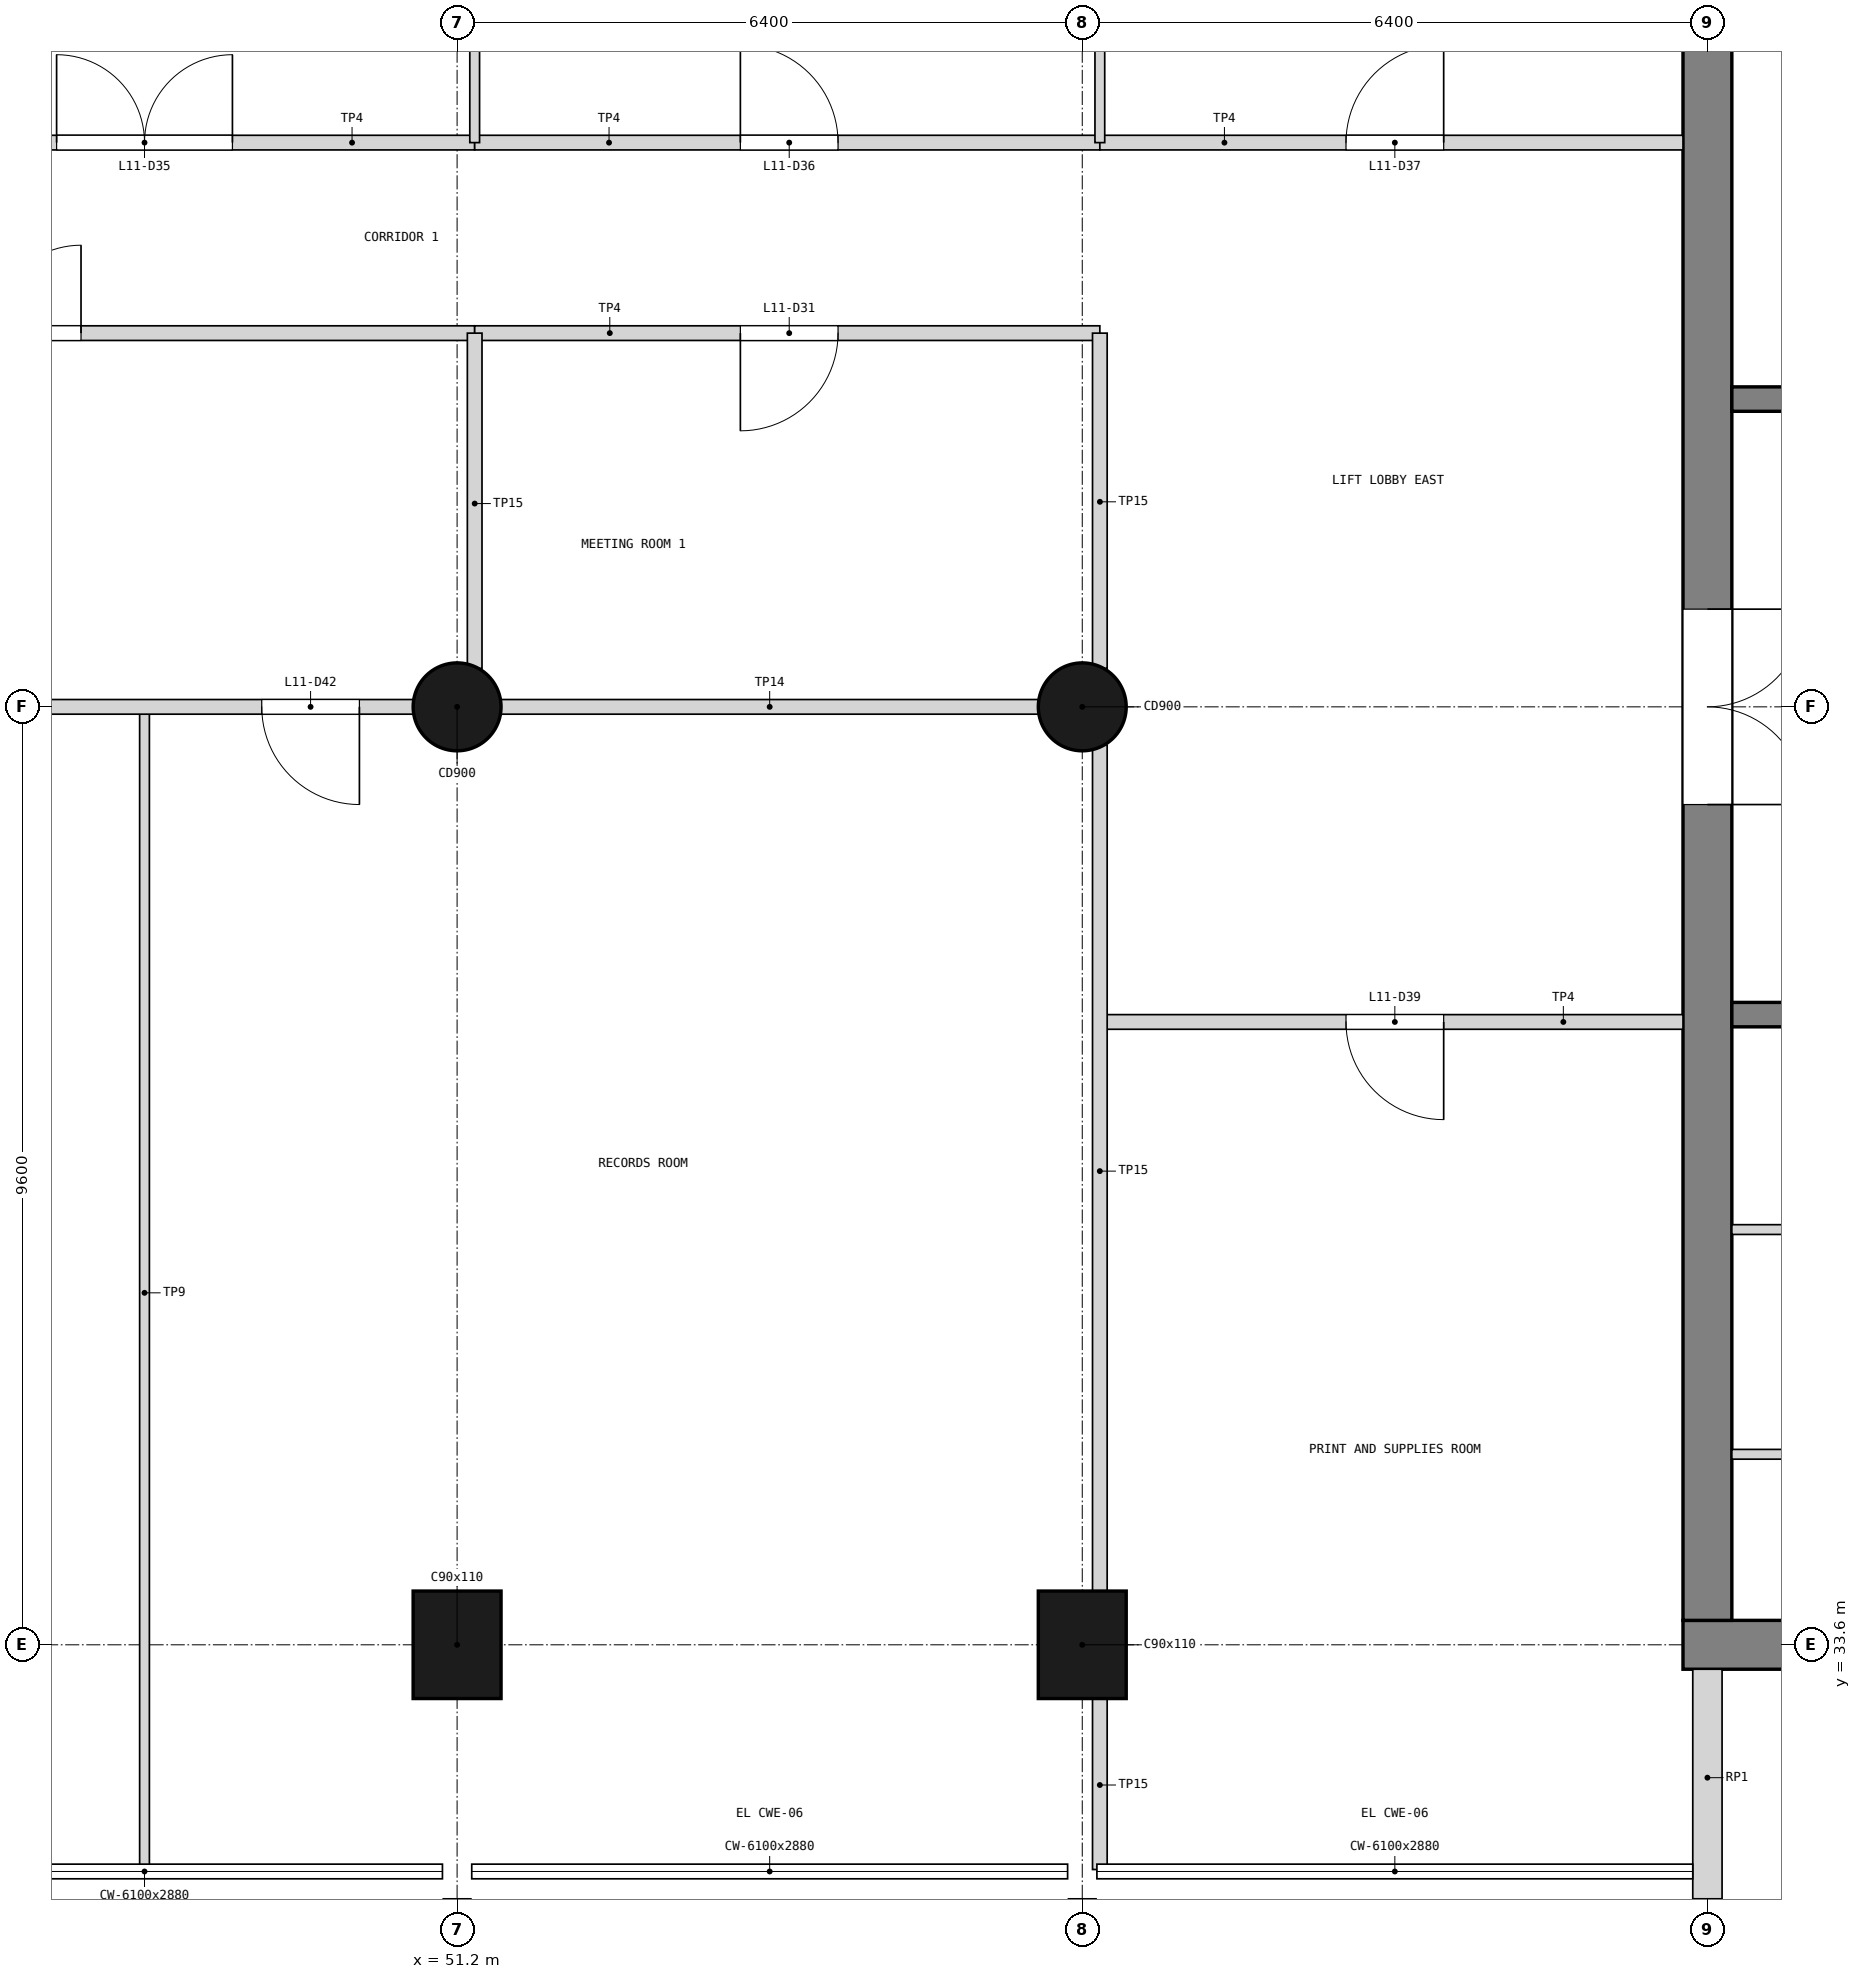
"""IFC4 building model, lengths in metres.
Left out: names, types, materials, properties, quantities, classifications, styles, units other than length and angle.
Written with IfcOpenShell. Run it as: python <this file> out.ifc"""

import sys

from ifc_helpers import new_model, si_unit, direction, frame, frame_2d, origin, origin_2d, place, context, subcontext, project, spatial, rectangle, circle, extrude, element, fill, save


model = new_model("IFC4")
c1 = context("Model", 3, precision=1e-05, world=origin(), true_north=direction((0.0, 1.0)))
c2 = subcontext(c1, "Body", "Model", "MODEL_VIEW")
j1 = project(units=[si_unit("LENGTHUNIT", "METRE"), si_unit("PLANEANGLEUNIT", "RADIAN")], contexts=[c1])
p1 = place(None, origin())
s1 = spatial("IfcSite", under=j1, at=p1, CompositionType="ELEMENT")
p2 = place(p1, origin())
s2 = spatial("IfcBuilding", under=s1, at=p2, CompositionType="ELEMENT")
p3 = place(p2, frame((0.0, 0.0, 44.4)))
s3 = spatial("IfcBuildingStorey", under=s2, at=p3, CompositionType="ELEMENT", Elevation=44.4)
p4 = place(p3, frame((63.75, 33.6, 0.0), z_axis=(0.0, 0.0, 1.0), x_axis=(1.0, 0.0, 0.0)))
e1 = element("IfcWall", 1, at=p4, inside=s3, PredefinedType="SHEAR", context=c2, shape_type="SweptSolid", body=[
    extrude(rectangle(XDim=13.3, YDim=0.5, at=frame_2d((6.65, 0.0))), origin(), (0.0, 0.0, 1.0), 3.9),
])
p5 = place(p4, frame((11.05, 0.0, 1.0)))
e2 = element("IfcOpeningElement", 2, at=p5, cuts=e1, PredefinedType="OPENING", context=c2, shape_type="SweptSolid", body=[
    extrude(rectangle(XDim=0.4, YDim=2.0, at=frame_2d((0.2, 1.0))), frame((0.0, 0.26, 0.0), z_axis=(0.0, -1.0, 0.0), x_axis=(1.0, 0.0, 0.0)), (0.0, 0.0, 1.0), 0.52),
])
p6 = place(p3, frame((64.0, 33.85, 0.0), z_axis=(0.0, 0.0, 1.0), x_axis=(0.0, 1.0, 0.0)))
e3 = element("IfcWall", 3, at=p6, inside=s3, PredefinedType="SHEAR", context=c2, shape_type="SweptSolid", body=[
    extrude(rectangle(XDim=18.7, YDim=0.5, at=frame_2d((9.35, 0.0))), origin(), (0.0, 0.0, 1.0), 3.9),
])
p7 = place(p6, frame((8.35, 0.0, 0.0)))
e4 = element("IfcOpeningElement", 4, at=p7, cuts=e3, PredefinedType="OPENING", context=c2, shape_type="SweptSolid", body=[
    extrude(rectangle(XDim=2.0, YDim=2.1, at=frame_2d((1.0, 1.05))), frame((0.0, 0.26, 0.0), z_axis=(0.0, -1.0, 0.0), x_axis=(1.0, 0.0, 0.0)), (0.0, 0.0, 1.0), 0.52),
])
p8 = place(p3, frame((51.2, 33.6, 0.0), z_axis=(0.0, 0.0, 1.0), x_axis=(1.0, 0.0, 0.0)))
e5 = element("IfcColumn", 5, at=p8, inside=s3, PredefinedType="COLUMN", context=c2, shape_type="SweptSolid", body=[
    extrude(rectangle(XDim=0.9, YDim=1.1, at=origin_2d()), origin(), (0.0, 0.0, 1.0), 3.9),
])
p9 = place(p3, frame((51.2, 43.2, 0.0), z_axis=(0.0, 0.0, 1.0), x_axis=(1.0, 0.0, 0.0)))
e6 = element("IfcColumn", 6, at=p9, inside=s3, PredefinedType="COLUMN", context=c2, shape_type="SweptSolid", body=[
    extrude(circle(Radius=0.45, at=origin_2d()), origin(), (0.0, 0.0, 1.0), 3.9),
])
p10 = place(p3, frame((57.6, 33.6, 0.0), z_axis=(0.0, 0.0, 1.0), x_axis=(1.0, 0.0, 0.0)))
e7 = element("IfcColumn", 7, at=p10, inside=s3, PredefinedType="COLUMN", context=c2, shape_type="SweptSolid", body=[
    extrude(rectangle(XDim=0.9, YDim=1.1, at=origin_2d()), origin(), (0.0, 0.0, 1.0), 3.9),
])
p11 = place(p3, frame((57.6, 43.2, 0.0), z_axis=(0.0, 0.0, 1.0), x_axis=(1.0, 0.0, 0.0)))
e8 = element("IfcColumn", 8, at=p11, inside=s3, PredefinedType="COLUMN", context=c2, shape_type="SweptSolid", body=[
    extrude(circle(Radius=0.45, at=origin_2d()), origin(), (0.0, 0.0, 1.0), 3.9),
])
p12 = place(p3, frame((64.0, 31.0, 0.0), z_axis=(0.0, 0.0, 1.0), x_axis=(0.0, 1.0, 0.0)))
e9 = element("IfcWall", 9, at=p12, inside=s3, PredefinedType="SOLIDWALL", context=c2, shape_type="SweptSolid", body=[
    extrude(rectangle(XDim=2.35, YDim=0.3, at=frame_2d((1.175, 0.0))), origin(), (0.0, 0.0, 1.0), 2.88),
])
for number, where, z_axis, x_axis in (
    (10, (69.725, 40.05, 0.0), (0.0, 0.0, 1.0), (-1.0, 0.0, 0.0)),
    (11, (69.725, 46.35, 0.0), (0.0, 0.0, 1.0), (-1.0, 0.0, 0.0)),
):
    element("IfcWall", number, at=place(p3, frame(where, z_axis=z_axis, x_axis=x_axis)), inside=s3, PredefinedType="SOLIDWALL", context=c2, shape_type="SweptSolid", body=[
        extrude(rectangle(XDim=5.475, YDim=0.25, at=frame_2d((2.738, 0.0))), origin(), (0.0, 0.0, 1.0), 3.6),
    ])
p13 = place(p3, frame((69.475, 35.55, 0.0), z_axis=(0.0, 0.0, 1.0), x_axis=(-1.0, 0.0, 0.0)))
e12 = element("IfcWall", 12, at=p13, inside=s3, PredefinedType="PARTITIONING", context=c2, shape_type="SweptSolid", body=[
    extrude(rectangle(XDim=5.225, YDim=0.1, at=frame_2d((2.613, 0.0))), origin(), (0.0, 0.0, 1.0), 3.6),
])
p14 = place(p3, frame((67.925, 37.85, 0.0), z_axis=(0.0, 0.0, 1.0), x_axis=(-1.0, 0.0, 0.0)))
e13 = element("IfcWall", 13, at=p14, inside=s3, PredefinedType="PARTITIONING", context=c2, shape_type="SweptSolid", body=[
    extrude(rectangle(XDim=3.675, YDim=0.1, at=frame_2d((1.837, 0.0))), origin(), (0.0, 0.0, 1.0), 3.6),
])
p15 = place(p3, frame((48.0, 31.3, 0.0), z_axis=(0.0, 0.0, 1.0), x_axis=(0.0, 1.0, 0.0)))
e14 = element("IfcWall", 14, at=p15, inside=s3, PredefinedType="PARTITIONING", context=c2, shape_type="SweptSolid", body=[
    extrude(rectangle(XDim=11.9, YDim=0.1, at=frame_2d((5.95, 0.0))), origin(), (0.0, 0.0, 1.0), 3.08),
])
p16 = place(p3, frame((31.82, 47.025, 0.0), z_axis=(0.0, 0.0, 1.0), x_axis=(1.0, 0.0, 0.0)))
e15 = element("IfcWall", 15, at=p16, inside=s3, PredefinedType="PARTITIONING", context=c2, shape_type="SweptSolid", body=[
    extrude(rectangle(XDim=19.56, YDim=0.15, at=frame_2d((9.78, 0.0))), origin(), (0.0, 0.0, 1.0), 3.68),
])
p17 = place(p16, frame((4.03, 0.0, 0.0)))
e16 = element("IfcOpeningElement", 16, at=p17, cuts=e15, PredefinedType="OPENING", context=c2, shape_type="SweptSolid", body=[
    extrude(rectangle(XDim=1.8, YDim=2.1, at=frame_2d((0.9, 1.05))), frame((0.0, 0.085, 0.0), z_axis=(0.0, -1.0, 0.0), x_axis=(1.0, 0.0, 0.0)), (0.0, 0.0, 1.0), 0.17),
])
p18 = place(p16, frame((13.73, 0.0, 0.0)))
e17 = element("IfcOpeningElement", 17, at=p18, cuts=e15, PredefinedType="OPENING", context=c2, shape_type="SweptSolid", body=[
    extrude(rectangle(XDim=1.8, YDim=2.1, at=frame_2d((0.9, 1.05))), frame((0.0, 0.085, 0.0), z_axis=(0.0, -1.0, 0.0), x_axis=(1.0, 0.0, 0.0)), (0.0, 0.0, 1.0), 0.17),
])
p19 = place(p3, frame((51.38, 47.025, 0.0), z_axis=(0.0, 0.0, 1.0), x_axis=(1.0, 0.0, 0.0)))
e18 = element("IfcWall", 18, at=p19, inside=s3, PredefinedType="PARTITIONING", context=c2, shape_type="SweptSolid", body=[
    extrude(rectangle(XDim=6.4, YDim=0.15, at=frame_2d((3.2, 0.0))), origin(), (0.0, 0.0, 1.0), 3.68),
])
p20 = place(p19, frame((2.72, 0.0, 0.0)))
e19 = element("IfcOpeningElement", 19, at=p20, cuts=e18, PredefinedType="OPENING", context=c2, shape_type="SweptSolid", body=[
    extrude(rectangle(XDim=1.0, YDim=2.1, at=frame_2d((0.5, 1.05))), frame((0.0, 0.085, 0.0), z_axis=(0.0, -1.0, 0.0), x_axis=(1.0, 0.0, 0.0)), (0.0, 0.0, 1.0), 0.17),
])
p21 = place(p3, frame((51.38, 43.592, 0.0), z_axis=(0.0, 0.0, 1.0), x_axis=(0.0, 1.0, 0.0)))
e20 = element("IfcWall", 20, at=p21, inside=s3, PredefinedType="PARTITIONING", context=c2, shape_type="SweptSolid", body=[
    extrude(rectangle(XDim=3.433, YDim=0.15, at=frame_2d((1.716, 0.0))), origin(), (0.0, 0.0, 1.0), 2.78),
])
p22 = place(p3, frame((44.62, 48.975, 0.0), z_axis=(0.0, 0.0, 1.0), x_axis=(1.0, 0.0, 0.0)))
e21 = element("IfcWall", 21, at=p22, inside=s3, PredefinedType="PARTITIONING", context=c2, shape_type="SweptSolid", body=[
    extrude(rectangle(XDim=6.76, YDim=0.15, at=frame_2d((3.38, 0.0))), origin(), (0.0, 0.0, 1.0), 3.68),
])
p23 = place(p22, frame((2.48, 0.0, 0.0)))
e22 = element("IfcOpeningElement", 22, at=p23, cuts=e21, PredefinedType="OPENING", context=c2, shape_type="SweptSolid", body=[
    extrude(rectangle(XDim=1.8, YDim=2.1, at=frame_2d((0.9, 1.05))), frame((0.0, 0.085, 0.0), z_axis=(0.0, -1.0, 0.0), x_axis=(1.0, 0.0, 0.0)), (0.0, 0.0, 1.0), 0.17),
])
p24 = place(p3, frame((51.38, 48.975, 0.0), z_axis=(0.0, 0.0, 1.0), x_axis=(1.0, 0.0, 0.0)))
e23 = element("IfcWall", 23, at=p24, inside=s3, PredefinedType="PARTITIONING", context=c2, shape_type="SweptSolid", body=[
    extrude(rectangle(XDim=6.4, YDim=0.15, at=frame_2d((3.2, 0.0))), origin(), (0.0, 0.0, 1.0), 3.68),
])
p25 = place(p24, frame((2.72, 0.0, 0.0)))
e24 = element("IfcOpeningElement", 24, at=p25, cuts=e23, PredefinedType="OPENING", context=c2, shape_type="SweptSolid", body=[
    extrude(rectangle(XDim=1.0, YDim=2.1, at=frame_2d((0.5, 1.05))), frame((0.0, 0.085, 0.0), z_axis=(0.0, -1.0, 0.0), x_axis=(1.0, 0.0, 0.0)), (0.0, 0.0, 1.0), 0.17),
])
p26 = place(p3, frame((57.78, 48.975, 0.0), z_axis=(0.0, 0.0, 1.0), x_axis=(1.0, 0.0, 0.0)))
e25 = element("IfcWall", 25, at=p26, inside=s3, PredefinedType="PARTITIONING", context=c2, shape_type="SweptSolid", body=[
    extrude(rectangle(XDim=5.97, YDim=0.15, at=frame_2d((2.985, 0.0))), origin(), (0.0, 0.0, 1.0), 3.68),
])
p27 = place(p26, frame((2.52, 0.0, 0.0)))
e26 = element("IfcOpeningElement", 26, at=p27, cuts=e25, PredefinedType="OPENING", context=c2, shape_type="SweptSolid", body=[
    extrude(rectangle(XDim=1.0, YDim=2.1, at=frame_2d((0.5, 1.05))), frame((0.0, 0.085, 0.0), z_axis=(0.0, -1.0, 0.0), x_axis=(1.0, 0.0, 0.0)), (0.0, 0.0, 1.0), 0.17),
])
for number, where, z_axis, x_axis in (
    (27, (51.38, 48.975, 0.0), (0.0, 0.0, 1.0), (0.0, 1.0, 0.0)),
    (28, (57.78, 48.975, 0.0), (0.0, 0.0, 1.0), (0.0, 1.0, 0.0)),
):
    element("IfcWall", number, at=place(p3, frame(where, z_axis=z_axis, x_axis=x_axis)), inside=s3, PredefinedType="PARTITIONING", context=c2, shape_type="SweptSolid", body=[
        extrude(rectangle(XDim=3.295, YDim=0.1, at=frame_2d((1.647, 0.0))), origin(), (0.0, 0.0, 1.0), 2.78),
    ])
p28 = place(p3, frame((31.82, 43.2, 0.0), z_axis=(0.0, 0.0, 1.0), x_axis=(1.0, 0.0, 0.0)))
e29 = element("IfcWall", 29, at=p28, inside=s3, PredefinedType="PARTITIONING", context=c2, shape_type="SweptSolid", body=[
    extrude(rectangle(XDim=25.96, YDim=0.15, at=frame_2d((12.98, 0.0))), origin(), (0.0, 0.0, 1.0), 2.88),
])
p29 = place(p28, frame((4.025, 0.0, 0.0)))
e30 = element("IfcOpeningElement", 30, at=p29, cuts=e29, PredefinedType="OPENING", context=c2, shape_type="SweptSolid", body=[
    extrude(rectangle(XDim=1.8, YDim=2.1, at=frame_2d((0.9, 1.05))), frame((0.0, 0.085, 0.0), z_axis=(0.0, -1.0, 0.0), x_axis=(1.0, 0.0, 0.0)), (0.0, 0.0, 1.0), 0.17),
])
p30 = place(p28, frame((10.43, 0.0, 0.0)))
e31 = element("IfcOpeningElement", 31, at=p30, cuts=e29, PredefinedType="OPENING", context=c2, shape_type="SweptSolid", body=[
    extrude(rectangle(XDim=1.8, YDim=2.1, at=frame_2d((0.9, 1.05))), frame((0.0, 0.085, 0.0), z_axis=(0.0, -1.0, 0.0), x_axis=(1.0, 0.0, 0.0)), (0.0, 0.0, 1.0), 0.17),
])
p31 = place(p28, frame((17.38, 0.0, 0.0)))
e32 = element("IfcOpeningElement", 32, at=p31, cuts=e29, PredefinedType="OPENING", context=c2, shape_type="SweptSolid", body=[
    extrude(rectangle(XDim=1.0, YDim=2.1, at=frame_2d((0.5, 1.05))), frame((0.0, 0.085, 0.0), z_axis=(0.0, -1.0, 0.0), x_axis=(1.0, 0.0, 0.0)), (0.0, 0.0, 1.0), 0.17),
])
p32 = place(p3, frame((57.78, 39.975, 0.0), z_axis=(0.0, 0.0, 1.0), x_axis=(1.0, 0.0, 0.0)))
e33 = element("IfcWall", 33, at=p32, inside=s3, PredefinedType="PARTITIONING", context=c2, shape_type="SweptSolid", body=[
    extrude(rectangle(XDim=5.97, YDim=0.15, at=frame_2d((2.985, 0.0))), origin(), (0.0, 0.0, 1.0), 3.68),
])
p33 = place(p32, frame((2.52, 0.0, 0.0)))
e34 = element("IfcOpeningElement", 34, at=p33, cuts=e33, PredefinedType="OPENING", context=c2, shape_type="SweptSolid", body=[
    extrude(rectangle(XDim=1.0, YDim=2.1, at=frame_2d((0.5, 1.05))), frame((0.0, 0.085, 0.0), z_axis=(0.0, -1.0, 0.0), x_axis=(1.0, 0.0, 0.0)), (0.0, 0.0, 1.0), 0.17),
])
p34 = place(p3, frame((57.78, 31.3, 0.0), z_axis=(0.0, 0.0, 1.0), x_axis=(0.0, 1.0, 0.0)))
e35 = element("IfcWall", 35, at=p34, inside=s3, PredefinedType="PARTITIONING", context=c2, shape_type="SweptSolid", body=[
    extrude(rectangle(XDim=1.77, YDim=0.15, at=frame_2d((0.885, 0.0))), origin(), (0.0, 0.0, 1.0), 2.78),
])
p35 = place(p3, frame((57.78, 34.13, 0.0), z_axis=(0.0, 0.0, 1.0), x_axis=(0.0, 1.0, 0.0)))
e36 = element("IfcWall", 36, at=p35, inside=s3, PredefinedType="PARTITIONING", context=c2, shape_type="SweptSolid", body=[
    extrude(rectangle(XDim=8.678, YDim=0.15, at=frame_2d((4.339, 0.0))), origin(), (0.0, 0.0, 1.0), 2.78),
])
p36 = place(p3, frame((57.78, 43.592, 0.0), z_axis=(0.0, 0.0, 1.0), x_axis=(0.0, 1.0, 0.0)))
e37 = element("IfcWall", 37, at=p36, inside=s3, PredefinedType="PARTITIONING", context=c2, shape_type="SweptSolid", body=[
    extrude(rectangle(XDim=3.433, YDim=0.15, at=frame_2d((1.716, 0.0))), origin(), (0.0, 0.0, 1.0), 2.78),
])
p37 = place(p7, frame((2.0, 0.0, 0.0), z_axis=(0.0, 0.0, 1.0), x_axis=(-1.0, 0.0, 0.0)))
e38 = element("IfcDoor", 38, at=p37, inside=s3, OperationType="DOUBLE_DOOR_SINGLE_SWING", PredefinedType="DOOR", context=c2, shape_type="SweptSolid", body=[
    extrude(rectangle(XDim=2.0, YDim=2.1, at=frame_2d((1.0, 1.05))), frame((0.0, 0.025, 0.0), z_axis=(0.0, -1.0, 0.0), x_axis=(1.0, 0.0, 0.0)), (0.0, 0.0, 1.0), 0.05),
])
fill(e4, e38)
p38 = place(p18, origin())
e39 = element("IfcDoor", 39, at=p38, inside=s3, OperationType="DOUBLE_DOOR_SINGLE_SWING", PredefinedType="DOOR", context=c2, shape_type="SweptSolid", body=[
    extrude(rectangle(XDim=1.8, YDim=2.1, at=frame_2d((0.9, 1.05))), frame((0.0, 0.025, 0.0), z_axis=(0.0, -1.0, 0.0), x_axis=(1.0, 0.0, 0.0)), (0.0, 0.0, 1.0), 0.05),
])
fill(e17, e39)
p39 = place(p20, frame((1.0, 0.0, 0.0), z_axis=(0.0, 0.0, 1.0), x_axis=(-1.0, 0.0, 0.0)))
e40 = element("IfcDoor", 40, at=p39, inside=s3, OperationType="SINGLE_SWING_RIGHT", PredefinedType="DOOR", context=c2, shape_type="SweptSolid", body=[
    extrude(rectangle(XDim=1.0, YDim=2.1, at=frame_2d((0.5, 1.05))), frame((0.0, 0.025, 0.0), z_axis=(0.0, -1.0, 0.0), x_axis=(1.0, 0.0, 0.0)), (0.0, 0.0, 1.0), 0.05),
])
fill(e19, e40)
p40 = place(p23, origin())
e41 = element("IfcDoor", 41, at=p40, inside=s3, OperationType="DOUBLE_DOOR_SINGLE_SWING", PredefinedType="DOOR", context=c2, shape_type="SweptSolid", body=[
    extrude(rectangle(XDim=1.8, YDim=2.1, at=frame_2d((0.9, 1.05))), frame((0.0, 0.025, 0.0), z_axis=(0.0, -1.0, 0.0), x_axis=(1.0, 0.0, 0.0)), (0.0, 0.0, 1.0), 0.05),
])
fill(e22, e41)
p41 = place(p25, origin())
e42 = element("IfcDoor", 42, at=p41, inside=s3, OperationType="SINGLE_SWING_LEFT", PredefinedType="DOOR", context=c2, shape_type="SweptSolid", body=[
    extrude(rectangle(XDim=1.0, YDim=2.1, at=frame_2d((0.5, 1.05))), frame((0.0, 0.025, 0.0), z_axis=(0.0, -1.0, 0.0), x_axis=(1.0, 0.0, 0.0)), (0.0, 0.0, 1.0), 0.05),
])
fill(e24, e42)
p42 = place(p27, origin())
e43 = element("IfcDoor", 43, at=p42, inside=s3, OperationType="SINGLE_SWING_RIGHT", PredefinedType="DOOR", context=c2, shape_type="SweptSolid", body=[
    extrude(rectangle(XDim=1.0, YDim=2.1, at=frame_2d((0.5, 1.05))), frame((0.0, 0.025, 0.0), z_axis=(0.0, -1.0, 0.0), x_axis=(1.0, 0.0, 0.0)), (0.0, 0.0, 1.0), 0.05),
])
fill(e26, e43)
p43 = place(p33, frame((1.0, 0.0, 0.0), z_axis=(0.0, 0.0, 1.0), x_axis=(-1.0, 0.0, 0.0)))
e44 = element("IfcDoor", 44, at=p43, inside=s3, OperationType="SINGLE_SWING_LEFT", PredefinedType="DOOR", context=c2, shape_type="SweptSolid", body=[
    extrude(rectangle(XDim=1.0, YDim=2.1, at=frame_2d((0.5, 1.05))), frame((0.0, 0.025, 0.0), z_axis=(0.0, -1.0, 0.0), x_axis=(1.0, 0.0, 0.0)), (0.0, 0.0, 1.0), 0.05),
])
fill(e34, e44)
p44 = place(p31, frame((1.0, 0.0, 0.0), z_axis=(0.0, 0.0, 1.0), x_axis=(-1.0, 0.0, 0.0)))
e45 = element("IfcDoor", 45, at=p44, inside=s3, OperationType="SINGLE_SWING_LEFT", PredefinedType="DOOR", context=c2, shape_type="SweptSolid", body=[
    extrude(rectangle(XDim=1.0, YDim=2.1, at=frame_2d((0.5, 1.05))), frame((0.0, 0.025, 0.0), z_axis=(0.0, -1.0, 0.0), x_axis=(1.0, 0.0, 0.0)), (0.0, 0.0, 1.0), 0.05),
])
fill(e32, e45)
save(model, sys.argv[1])
